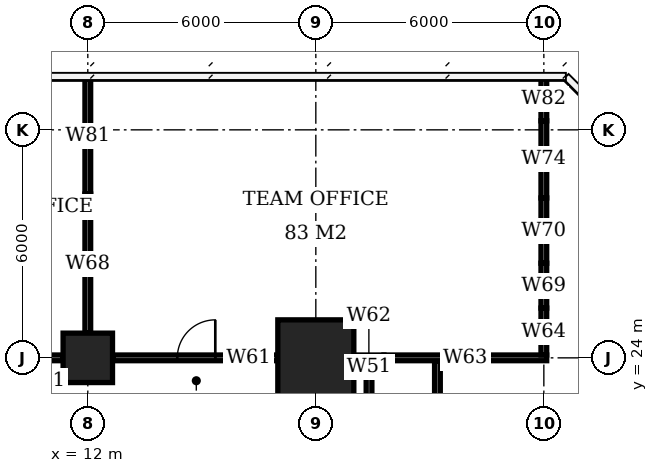
"""IFC4 building model, lengths in metres.
Left out: names, types, materials, properties, quantities, classifications, styles, units other than length and angle.
Written with IfcOpenShell. Run it as: python <this file> out.ifc"""

import sys

from ifc_helpers import new_model, si_unit, direction, frame, frame_2d, origin, origin_2d, place, context, subcontext, project, spatial, rectangle, extrude, element, fill, save


model = new_model("IFC4")
c1 = context("Model", 3, precision=1e-05, world=origin(), true_north=direction((0.0, 1.0)))
c2 = subcontext(c1, "Body", "Model", "MODEL_VIEW")
j1 = project(units=[si_unit("LENGTHUNIT", "METRE"), si_unit("PLANEANGLEUNIT", "RADIAN")], contexts=[c1])
p1 = place(None, origin())
s1 = spatial("IfcSite", under=j1, at=p1, CompositionType="ELEMENT")
p2 = place(p1, origin())
s2 = spatial("IfcBuilding", under=s1, at=p2, CompositionType="ELEMENT")
p3 = place(p2, frame((0.0, 0.0, 173.3)))
s3 = spatial("IfcBuildingStorey", under=s2, at=p3, CompositionType="ELEMENT", Elevation=173.3)
p4 = place(p3, frame((12.0, 24.0, 0.0), z_axis=(0.0, 0.0, 1.0), x_axis=(1.0, 0.0, 0.0)))
e1 = element("IfcColumn", 1, at=p4, inside=s3, PredefinedType="COLUMN", context=c2, shape_type="SweptSolid", body=[
    extrude(rectangle(XDim=1.3, YDim=1.3, at=origin_2d()), origin(), (0.0, 0.0, 1.0), 3.9),
])
p5 = place(p3, frame((18.0, 24.0, 0.0), z_axis=(0.0, 0.0, 1.0), x_axis=(1.0, 0.0, 0.0)))
e2 = element("IfcColumn", 2, at=p5, inside=s3, PredefinedType="COLUMN", context=c2, shape_type="SweptSolid", body=[
    extrude(rectangle(XDim=2.0, YDim=2.0, at=origin_2d()), origin(), (0.0, 0.0, 1.0), 3.9),
])
p6 = place(p3, frame((9.075, 24.0, 0.0), z_axis=(0.0, 0.0, 1.0), x_axis=(1.0, 0.0, 0.0)))
e3 = element("IfcWall", 3, at=p6, inside=s3, PredefinedType="PARTITIONING", context=c2, shape_type="SweptSolid", body=[
    extrude(rectangle(XDim=2.265, YDim=0.15, at=frame_2d((1.133, 0.0))), origin(), (0.0, 0.0, 1.0), 3.65),
])
p7 = place(p6, frame((0.325, 0.0, 0.0)))
e4 = element("IfcOpeningElement", 4, at=p7, cuts=e3, PredefinedType="OPENING", context=c2, shape_type="SweptSolid", body=[
    extrude(rectangle(XDim=1.0, YDim=2.1, at=frame_2d((0.5, 1.05))), frame((0.0, 0.085, 0.0), z_axis=(0.0, -1.0, 0.0), x_axis=(1.0, 0.0, 0.0)), (0.0, 0.0, 1.0), 0.17),
])
p8 = place(p3, frame((12.66, 24.0, 0.0), z_axis=(0.0, 0.0, 1.0), x_axis=(1.0, 0.0, 0.0)))
e5 = element("IfcWall", 5, at=p8, inside=s3, PredefinedType="PARTITIONING", context=c2, shape_type="SweptSolid", body=[
    extrude(rectangle(XDim=4.34, YDim=0.15, at=frame_2d((2.17, 0.0))), origin(), (0.0, 0.0, 1.0), 3.65),
])
p9 = place(p8, frame((1.695, 0.0, 0.0)))
e6 = element("IfcOpeningElement", 6, at=p9, cuts=e5, PredefinedType="OPENING", context=c2, shape_type="SweptSolid", body=[
    extrude(rectangle(XDim=1.0, YDim=2.1, at=frame_2d((0.5, 1.05))), frame((0.0, 0.085, 0.0), z_axis=(0.0, -1.0, 0.0), x_axis=(1.0, 0.0, 0.0)), (0.0, 0.0, 1.0), 0.17),
])
p10 = place(p3, frame((19.0, 24.0, 0.0), z_axis=(0.0, 0.0, 1.0), x_axis=(1.0, 0.0, 0.0)))
e7 = element("IfcWall", 7, at=p10, inside=s3, PredefinedType="PARTITIONING", context=c2, shape_type="SweptSolid", body=[
    extrude(rectangle(XDim=0.792, YDim=0.15, at=frame_2d((0.396, 0.0))), origin(), (0.0, 0.0, 1.0), 2.65),
])
p11 = place(p3, frame((19.792, 24.0, 0.0), z_axis=(0.0, 0.0, 1.0), x_axis=(1.0, 0.0, 0.0)))
e8 = element("IfcWall", 8, at=p11, inside=s3, PredefinedType="PARTITIONING", context=c2, shape_type="SweptSolid", body=[
    extrude(rectangle(XDim=4.283, YDim=0.15, at=frame_2d((2.142, 0.0))), origin(), (0.0, 0.0, 1.0), 3.65),
])
p12 = place(p3, frame((12.0, 24.65, 0.0), z_axis=(0.0, 0.0, 1.0), x_axis=(0.0, 1.0, 0.0)))
e9 = element("IfcWall", 9, at=p12, inside=s3, PredefinedType="PARTITIONING", context=c2, shape_type="SweptSolid", body=[
    extrude(rectangle(XDim=3.66, YDim=0.15, at=frame_2d((1.83, 0.0))), origin(), (0.0, 0.0, 1.0), 2.65),
])
p13 = place(p3, frame((12.0, 28.31, 0.0), z_axis=(0.0, 0.0, 1.0), x_axis=(0.0, 1.0, 0.0)))
e10 = element("IfcWall", 10, at=p13, inside=s3, PredefinedType="PARTITIONING", context=c2, shape_type="SweptSolid", body=[
    extrude(rectangle(XDim=3.04, YDim=0.15, at=frame_2d((1.52, 0.0))), origin(), (0.0, 0.0, 1.0), 3.65),
])
p14 = place(p3, frame((24.0, 24.075, 0.0), z_axis=(0.0, 0.0, 1.0), x_axis=(0.0, 1.0, 0.0)))
e11 = element("IfcWall", 11, at=p14, inside=s3, PredefinedType="PARTITIONING", context=c2, shape_type="SweptSolid", body=[
    extrude(rectangle(XDim=1.235, YDim=0.15, at=frame_2d((0.618, 0.0))), origin(), (0.0, 0.0, 1.0), 3.65),
])
p15 = place(p3, frame((24.0, 25.31, 0.0), z_axis=(0.0, 0.0, 1.0), x_axis=(0.0, 1.0, 0.0)))
e12 = element("IfcWall", 12, at=p15, inside=s3, PredefinedType="PARTITIONING", context=c2, shape_type="SweptSolid", body=[
    extrude(rectangle(XDim=1.18, YDim=0.15, at=frame_2d((0.59, 0.0))), origin(), (0.0, 0.0, 1.0), 2.65),
])
p16 = place(p3, frame((24.0, 26.49, 0.0), z_axis=(0.0, 0.0, 1.0), x_axis=(0.0, 1.0, 0.0)))
e13 = element("IfcWall", 13, at=p16, inside=s3, PredefinedType="PARTITIONING", context=c2, shape_type="SweptSolid", body=[
    extrude(rectangle(XDim=1.718, YDim=0.15, at=frame_2d((0.859, 0.0))), origin(), (0.0, 0.0, 1.0), 3.65),
])
p17 = place(p3, frame((24.0, 28.208, 0.0), z_axis=(0.0, 0.0, 1.0), x_axis=(0.0, 1.0, 0.0)))
e14 = element("IfcWall", 14, at=p17, inside=s3, PredefinedType="PARTITIONING", context=c2, shape_type="SweptSolid", body=[
    extrude(rectangle(XDim=2.029, YDim=0.15, at=frame_2d((1.015, 0.0))), origin(), (0.0, 0.0, 1.0), 2.65),
])
p18 = place(p3, frame((24.0, 30.237, 0.0), z_axis=(0.0, 0.0, 1.0), x_axis=(0.0, 1.0, 0.0)))
e15 = element("IfcWall", 15, at=p18, inside=s3, PredefinedType="PARTITIONING", context=c2, shape_type="SweptSolid", body=[
    extrude(rectangle(XDim=1.163, YDim=0.15, at=frame_2d((0.582, 0.0))), origin(), (0.0, 0.0, 1.0), 3.65),
])
p19 = place(p3, frame((19.4, 16.0, 0.0), z_axis=(0.0, 0.0, 1.0), x_axis=(0.0, 1.0, 0.0)))
e16 = element("IfcWall", 16, at=p19, inside=s3, PredefinedType="PARTITIONING", context=c2, shape_type="SweptSolid", body=[
    extrude(rectangle(XDim=7.608, YDim=0.15, at=frame_2d((3.804, 0.0))), origin(), (0.0, 0.0, 1.0), 3.65),
])
p20 = place(p19, frame((2.7, 0.0, 0.0)))
e17 = element("IfcOpeningElement", 17, at=p20, cuts=e16, PredefinedType="OPENING", context=c2, shape_type="SweptSolid", body=[
    extrude(rectangle(XDim=1.0, YDim=2.1, at=frame_2d((0.5, 1.05))), frame((0.0, 0.085, 0.0), z_axis=(0.0, -1.0, 0.0), x_axis=(1.0, 0.0, 0.0)), (0.0, 0.0, 1.0), 0.17),
])
p21 = place(p3, frame((19.4, 23.608, 0.0), z_axis=(0.0, 0.0, 1.0), x_axis=(0.0, 1.0, 0.0)))
e18 = element("IfcWall", 18, at=p21, inside=s3, PredefinedType="PARTITIONING", context=c2, shape_type="SweptSolid", body=[
    extrude(rectangle(XDim=0.317, YDim=0.15, at=frame_2d((0.159, 0.0))), origin(), (0.0, 0.0, 1.0), 2.65),
])
p22 = place(p3, frame((21.2, 13.575, 0.0), z_axis=(0.0, 0.0, 1.0), x_axis=(0.0, 1.0, 0.0)))
e19 = element("IfcWall", 19, at=p22, inside=s3, PredefinedType="PARTITIONING", context=c2, shape_type="SweptSolid", body=[
    extrude(rectangle(XDim=10.35, YDim=0.15, at=frame_2d((5.175, 0.0))), origin(), (0.0, 0.0, 1.0), 3.65),
])
p23 = place(p22, frame((6.201, 0.0, 0.0)))
e20 = element("IfcOpeningElement", 20, at=p23, cuts=e19, PredefinedType="OPENING", context=c2, shape_type="SweptSolid", body=[
    extrude(rectangle(XDim=1.0, YDim=2.1, at=frame_2d((0.5, 1.05))), frame((0.0, 0.085, 0.0), z_axis=(0.0, -1.0, 0.0), x_axis=(1.0, 0.0, 0.0)), (0.0, 0.0, 1.0), 0.17),
])
p24 = place(p9, origin())
e21 = element("IfcDoor", 21, at=p24, inside=s3, OperationType="SINGLE_SWING_RIGHT", PredefinedType="DOOR", context=c2, shape_type="SweptSolid", body=[
    extrude(rectangle(XDim=1.0, YDim=2.1, at=frame_2d((0.5, 1.05))), frame((0.0, 0.025, 0.0), z_axis=(0.0, -1.0, 0.0), x_axis=(1.0, 0.0, 0.0)), (0.0, 0.0, 1.0), 0.05),
])
fill(e6, e21)
save(model, sys.argv[1])
